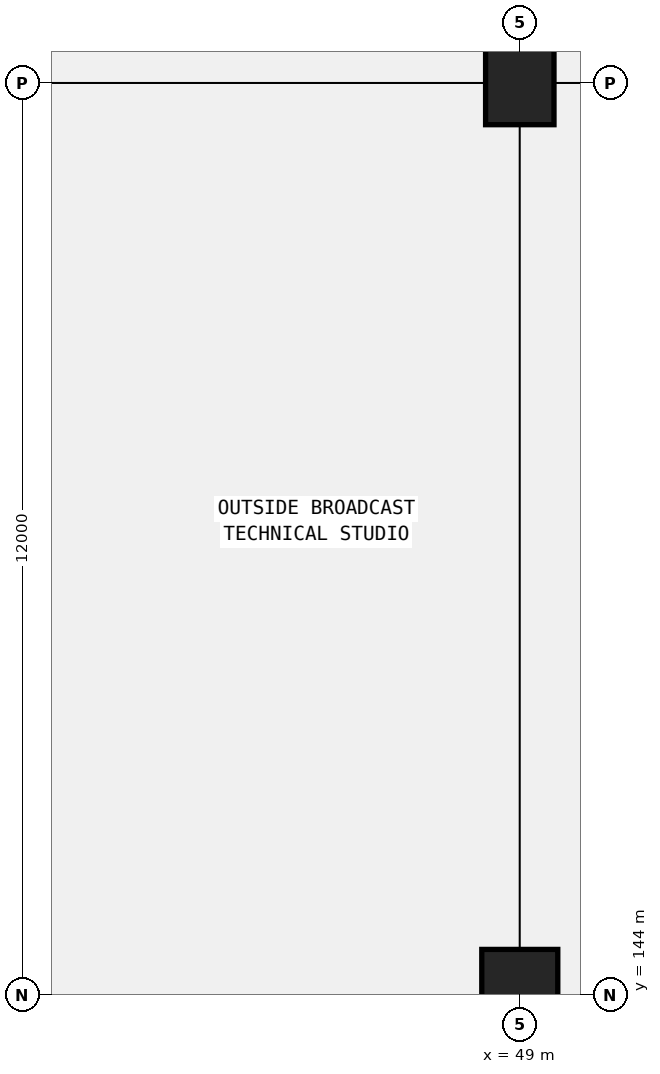
"""IFC4 building model, lengths in metres.
Left out: names, types, materials, properties, quantities, classifications, styles, units other than length and angle.
Written with IfcOpenShell. Run it as: python <this file> out.ifc"""

import sys

from ifc_helpers import new_model, si_unit, direction, frame, origin, origin_2d, place, context, subcontext, project, spatial, rectangle, extrude, element, save


model = new_model("IFC4")
c1 = context("Model", 3, precision=1e-05, world=origin(), true_north=direction((0.0, 1.0)))
c2 = subcontext(c1, "Body", "Model", "MODEL_VIEW")
j1 = project(units=[si_unit("LENGTHUNIT", "METRE"), si_unit("PLANEANGLEUNIT", "RADIAN")], contexts=[c1])
p1 = place(None, origin())
s1 = spatial("IfcSite", under=j1, at=p1, CompositionType="ELEMENT")
p2 = place(p1, origin())
s2 = spatial("IfcBuilding", under=s1, at=p2, CompositionType="ELEMENT")
p3 = place(p2, frame((0.0, 0.0, -4.8)))
s3 = spatial("IfcBuildingStorey", under=s2, at=p3, CompositionType="ELEMENT", Elevation=-4.8)
p4 = place(p3, frame((49.0, 144.0, 0.0), z_axis=(0.0, 0.0, 1.0), x_axis=(1.0, 0.0, 0.0)))
e1 = element("IfcColumn", 1, at=p4, inside=s3, PredefinedType="COLUMN", context=c2, shape_type="SweptSolid", body=[
    extrude(rectangle(XDim=1.0, YDim=1.2, at=origin_2d()), origin(), (0.0, 0.0, 1.0), 4.8),
])
p5 = place(p3, frame((49.0, 156.0, 0.0), z_axis=(0.0, 0.0, 1.0), x_axis=(1.0, 0.0, 0.0)))
e2 = element("IfcColumn", 2, at=p5, inside=s3, PredefinedType="COLUMN", context=c2, shape_type="SweptSolid", body=[
    extrude(rectangle(XDim=0.9, YDim=1.1, at=origin_2d()), origin(), (0.0, 0.0, 1.0), 4.8),
])
save(model, sys.argv[1])
